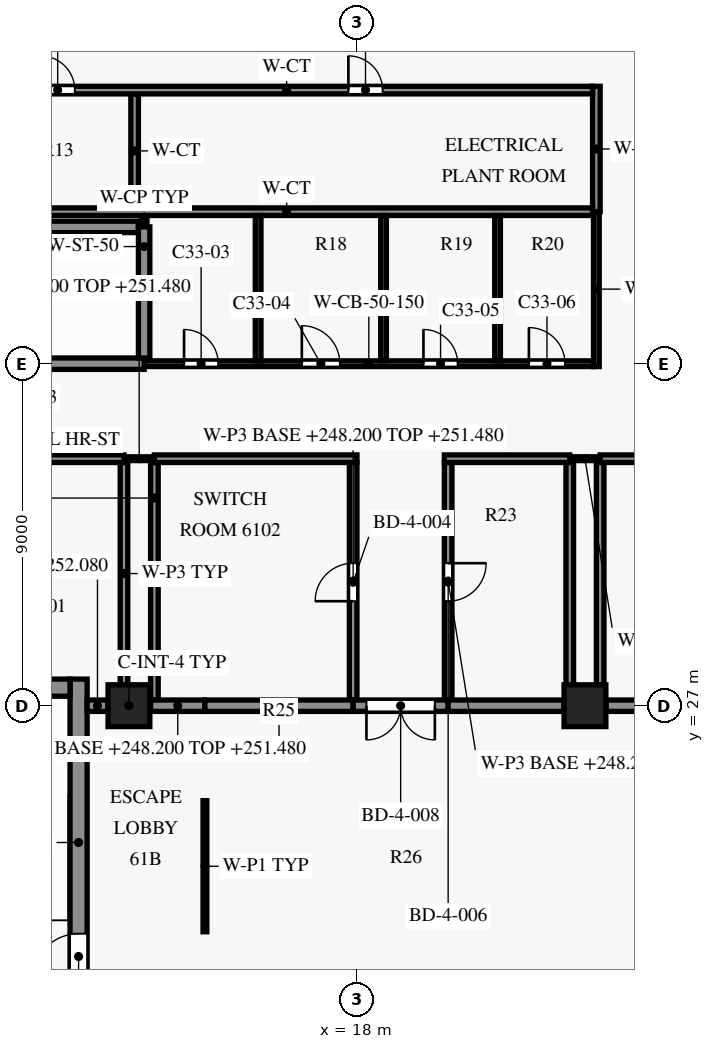
"""IFC4 building model, lengths in metres.
Left out: names, types, materials, properties, quantities, classifications, styles, units other than length and angle.
Written with IfcOpenShell. Run it as: python <this file> out.ifc"""

import sys

from ifc_helpers import new_model, si_unit, direction, frame, frame_2d, origin, origin_2d, place, context, subcontext, project, spatial, rectangle, extrude, element, fill, save


model = new_model("IFC4")
c1 = context("Model", 3, precision=1e-05, world=origin(), true_north=direction((0.0, 1.0)))
c2 = subcontext(c1, "Body", "Model", "MODEL_VIEW")
j1 = project(units=[si_unit("LENGTHUNIT", "METRE"), si_unit("PLANEANGLEUNIT", "RADIAN")], contexts=[c1])
p1 = place(None, origin())
s1 = spatial("IfcSite", under=j1, at=p1, CompositionType="ELEMENT")
p2 = place(p1, origin())
s2 = spatial("IfcBuilding", under=s1, at=p2, CompositionType="ELEMENT")
p3 = place(p2, frame((0.0, 0.0, 248.2)))
s3 = spatial("IfcBuildingStorey", under=s2, at=p3, CompositionType="ELEMENT", Elevation=248.2)
for number, where, z_axis, x_axis in (
    (1, (12.0, 27.0, 0.0), (0.0, 0.0, 1.0), (1.0, 0.0, 0.0)),
    (2, (24.0, 27.0, 0.0), (0.0, 0.0, 1.0), (1.0, 0.0, 0.0)),
):
    element("IfcColumn", number, at=place(p3, frame(where, z_axis=z_axis, x_axis=x_axis)), inside=s3, PredefinedType="COLUMN", context=c2, shape_type="SweptSolid", body=[
        extrude(rectangle(XDim=1.1, YDim=1.1, at=origin_2d()), origin(), (0.0, 0.0, 1.0), 4.2),
    ])
p4 = place(p3, frame((7.15, 27.475, 0.0), z_axis=(0.0, 0.0, 1.0), x_axis=(1.0, 0.0, 0.0)))
e3 = element("IfcWall", 3, at=p4, inside=s3, PredefinedType="SHEAR", context=c2, shape_type="SweptSolid", body=[
    extrude(rectangle(XDim=3.3, YDim=0.45, at=frame_2d((1.65, 0.0))), origin(), (0.0, 0.0, 1.0), 3.9),
])
p5 = place(p3, frame((12.4, 36.0, 0.0), z_axis=(0.0, 0.0, 1.0), x_axis=(1.0, 0.0, 0.0)))
e4 = element("IfcWall", 4, at=p5, inside=s3, PredefinedType="SHEAR", context=c2, shape_type="SweptSolid", body=[
    extrude(rectangle(XDim=11.825, YDim=0.15, at=frame_2d((5.913, 0.0))), origin(), (0.0, 0.0, 1.0), 3.9),
])
p6 = place(p5, frame((1.05, 0.0, 0.0)))
e5 = element("IfcOpeningElement", 5, at=p6, cuts=e4, PredefinedType="OPENING", context=c2, shape_type="SweptSolid", body=[
    extrude(rectangle(XDim=0.9, YDim=2.1, at=frame_2d((0.45, 1.05))), frame((0.0, 0.085, 0.0), z_axis=(0.0, -1.0, 0.0), x_axis=(1.0, 0.0, 0.0)), (0.0, 0.0, 1.0), 0.17),
])
p7 = place(p5, frame((4.15, 0.0, 0.0)))
e6 = element("IfcOpeningElement", 6, at=p7, cuts=e4, PredefinedType="OPENING", context=c2, shape_type="SweptSolid", body=[
    extrude(rectangle(XDim=1.0, YDim=2.1, at=frame_2d((0.5, 1.05))), frame((0.0, 0.085, 0.0), z_axis=(0.0, -1.0, 0.0), x_axis=(1.0, 0.0, 0.0)), (0.0, 0.0, 1.0), 0.17),
])
p8 = place(p5, frame((7.35, 0.0, 0.0)))
e7 = element("IfcOpeningElement", 7, at=p8, cuts=e4, PredefinedType="OPENING", context=c2, shape_type="SweptSolid", body=[
    extrude(rectangle(XDim=0.9, YDim=2.1, at=frame_2d((0.45, 1.05))), frame((0.0, 0.085, 0.0), z_axis=(0.0, -1.0, 0.0), x_axis=(1.0, 0.0, 0.0)), (0.0, 0.0, 1.0), 0.17),
])
p9 = place(p5, frame((10.125, 0.0, 0.0)))
e8 = element("IfcOpeningElement", 8, at=p9, cuts=e4, PredefinedType="OPENING", context=c2, shape_type="SweptSolid", body=[
    extrude(rectangle(XDim=0.95, YDim=2.1, at=frame_2d((0.475, 1.05))), frame((0.0, 0.085, 0.0), z_axis=(0.0, -1.0, 0.0), x_axis=(1.0, 0.0, 0.0)), (0.0, 0.0, 1.0), 0.17),
])
p10 = place(p3, frame((4.55, 36.0, 0.0), z_axis=(0.0, 0.0, 1.0), x_axis=(1.0, 0.0, 0.0)))
e9 = element("IfcWall", 9, at=p10, inside=s3, PredefinedType="SHEAR", context=c2, shape_type="SweptSolid", body=[
    extrude(rectangle(XDim=7.85, YDim=0.3, at=frame_2d((3.925, 0.0))), origin(), (0.0, 0.0, 1.0), 3.9),
])
p11 = place(p10, frame((0.15, 0.0, 0.0)))
e10 = element("IfcOpeningElement", 10, at=p11, cuts=e9, PredefinedType="OPENING", context=c2, shape_type="SweptSolid", body=[
    extrude(rectangle(XDim=1.5, YDim=2.2, at=frame_2d((0.75, 1.1))), frame((0.0, 0.16, 0.0), z_axis=(0.0, -1.0, 0.0), x_axis=(1.0, 0.0, 0.0)), (0.0, 0.0, 1.0), 0.32),
])
p12 = place(p3, frame((4.55, 39.6, 0.0), z_axis=(0.0, 0.0, 1.0), x_axis=(1.0, 0.0, 0.0)))
e11 = element("IfcWall", 11, at=p12, inside=s3, PredefinedType="SHEAR", context=c2, shape_type="SweptSolid", body=[
    extrude(rectangle(XDim=7.7, YDim=0.3, at=frame_2d((3.85, 0.0))), origin(), (0.0, 0.0, 1.0), 3.9),
])
p13 = place(p3, frame((8.1, 40.0, 0.0), z_axis=(0.0, 0.0, 1.0), x_axis=(1.0, 0.0, 0.0)))
e12 = element("IfcWall", 12, at=p13, inside=s3, PredefinedType="PARTITIONING", context=c2, shape_type="SweptSolid", body=[
    extrude(rectangle(XDim=16.1, YDim=0.2, at=frame_2d((8.05, 0.0))), origin(), (0.0, 0.0, 1.0), 3.9),
])
p14 = place(p3, frame((8.1, 43.2, 0.0), z_axis=(0.0, 0.0, 1.0), x_axis=(1.0, 0.0, 0.0)))
e13 = element("IfcWall", 13, at=p14, inside=s3, PredefinedType="PARTITIONING", context=c2, shape_type="SweptSolid", body=[
    extrude(rectangle(XDim=16.1, YDim=0.2, at=frame_2d((8.05, 0.0))), origin(), (0.0, 0.0, 1.0), 3.9),
])
p15 = place(p14, frame((1.575, 0.0, 0.0)))
e14 = element("IfcOpeningElement", 14, at=p15, cuts=e13, PredefinedType="OPENING", context=c2, shape_type="SweptSolid", body=[
    extrude(rectangle(XDim=0.9, YDim=2.1, at=frame_2d((0.45, 1.05))), frame((0.0, 0.11, 0.0), z_axis=(0.0, -1.0, 0.0), x_axis=(1.0, 0.0, 0.0)), (0.0, 0.0, 1.0), 0.22),
])
p16 = place(p14, frame((9.675, 0.0, 0.0)))
e15 = element("IfcOpeningElement", 15, at=p16, cuts=e13, PredefinedType="OPENING", context=c2, shape_type="SweptSolid", body=[
    extrude(rectangle(XDim=0.9, YDim=2.1, at=frame_2d((0.45, 1.05))), frame((0.0, 0.11, 0.0), z_axis=(0.0, -1.0, 0.0), x_axis=(1.0, 0.0, 0.0)), (0.0, 0.0, 1.0), 0.22),
])
p17 = place(p3, frame((10.675, 19.1, 0.0), z_axis=(0.0, 0.0, 1.0), x_axis=(0.0, 1.0, 0.0)))
e16 = element("IfcWall", 16, at=p17, inside=s3, PredefinedType="SHEAR", context=c2, shape_type="SweptSolid", body=[
    extrude(rectangle(XDim=8.6, YDim=0.45, at=frame_2d((4.3, 0.0))), origin(), (0.0, 0.0, 1.0), 3.9),
])
p18 = place(p17, frame((0.7, 0.0, 0.0)))
e17 = element("IfcOpeningElement", 17, at=p18, cuts=e16, PredefinedType="OPENING", context=c2, shape_type="SweptSolid", body=[
    extrude(rectangle(XDim=1.2, YDim=2.2, at=frame_2d((0.6, 1.1))), frame((0.0, 0.235, 0.0), z_axis=(0.0, -1.0, 0.0), x_axis=(1.0, 0.0, 0.0)), (0.0, 0.0, 1.0), 0.47),
])
p19 = place(p3, frame((12.15, 40.1, 0.0), z_axis=(0.0, 0.0, 1.0), x_axis=(0.0, 1.0, 0.0)))
e18 = element("IfcWall", 18, at=p19, inside=s3, PredefinedType="PARTITIONING", context=c2, shape_type="SweptSolid", body=[
    extrude(rectangle(XDim=3.0, YDim=0.2, at=frame_2d((1.5, 0.0))), origin(), (0.0, 0.0, 1.0), 3.9),
])
p20 = place(p3, frame((12.4, 39.6, 0.0), z_axis=(0.0, 0.0, 1.0), x_axis=(0.0, 1.0, 0.0)))
e19 = element("IfcWall", 19, at=p20, inside=s3, PredefinedType="PARTITIONING", context=c2, shape_type="SweptSolid", body=[
    extrude(rectangle(XDim=0.3, YDim=0.15, at=frame_2d((0.15, 0.0))), origin(), (0.0, 0.0, 1.0), 3.9),
])
p21 = place(p3, frame((12.4, 36.15, 0.0), z_axis=(0.0, 0.0, 1.0), x_axis=(0.0, 1.0, 0.0)))
e20 = element("IfcWall", 20, at=p21, inside=s3, PredefinedType="SHEAR", context=c2, shape_type="SweptSolid", body=[
    extrude(rectangle(XDim=3.45, YDim=0.3, at=frame_2d((1.725, 0.0))), origin(), (0.0, 0.0, 1.0), 3.9),
])
for number, where, z_axis, x_axis in (
    (21, (15.4, 36.075, 0.0), (0.0, 0.0, 1.0), (0.0, 1.0, 0.0)),
    (22, (18.7, 36.075, 0.0), (0.0, 0.0, 1.0), (0.0, 1.0, 0.0)),
    (23, (21.7, 36.075, 0.0), (0.0, 0.0, 1.0), (0.0, 1.0, 0.0)),
):
    element("IfcWall", number, at=place(p3, frame(where, z_axis=z_axis, x_axis=x_axis)), inside=s3, PredefinedType="PARTITIONING", context=c2, shape_type="SweptSolid", body=[
        extrude(rectangle(XDim=3.825, YDim=0.15, at=frame_2d((1.913, 0.0))), origin(), (0.0, 0.0, 1.0), 3.9),
    ])
p22 = place(p3, frame((24.3, 35.925, 0.0), z_axis=(0.0, 0.0, 1.0), x_axis=(0.0, 1.0, 0.0)))
e24 = element("IfcWall", 24, at=p22, inside=s3, PredefinedType="SHEAR", context=c2, shape_type="SweptSolid", body=[
    extrude(rectangle(XDim=4.075, YDim=0.15, at=frame_2d((2.038, 0.0))), origin(), (0.0, 0.0, 1.0), 3.9),
])
p23 = place(p3, frame((24.3, 40.0, 0.0), z_axis=(0.0, 0.0, 1.0), x_axis=(0.0, 1.0, 0.0)))
e25 = element("IfcWall", 25, at=p23, inside=s3, PredefinedType="PARTITIONING", context=c2, shape_type="SweptSolid", body=[
    extrude(rectangle(XDim=3.3, YDim=0.2, at=frame_2d((1.65, 0.0))), origin(), (0.0, 0.0, 1.0), 3.9),
])
p24 = place(p3, frame((14.0, 24.5, 0.0), z_axis=(0.0, 0.0, 1.0), x_axis=(0.0, -1.0, 0.0)))
e26 = element("IfcWall", 26, at=p24, inside=s3, PredefinedType="PARTITIONING", context=c2, shape_type="SweptSolid", body=[
    extrude(rectangle(XDim=3.45, YDim=0.1, at=frame_2d((1.725, 0.0))), origin(), (0.0, 0.0, 1.0), 3.88),
])
p25 = place(p3, frame((10.9, 27.0, 0.0), z_axis=(0.0, 0.0, 1.0), x_axis=(1.0, 0.0, 0.0)))
e27 = element("IfcWall", 27, at=p25, inside=s3, PredefinedType="PARTITIONING", context=c2, shape_type="SweptSolid", body=[
    extrude(rectangle(XDim=0.545, YDim=0.3, at=frame_2d((0.272, 0.0))), origin(), (0.0, 0.0, 1.0), 3.88),
])
p26 = place(p3, frame((12.57, 27.0, 0.0), z_axis=(0.0, 0.0, 1.0), x_axis=(1.0, 0.0, 0.0)))
e28 = element("IfcWall", 28, at=p26, inside=s3, PredefinedType="PARTITIONING", context=c2, shape_type="SweptSolid", body=[
    extrude(rectangle(XDim=1.43, YDim=0.3, at=frame_2d((0.715, 0.0))), origin(), (0.0, 0.0, 1.0), 3.28),
])
p27 = place(p3, frame((17.9, 27.0, 0.0), z_axis=(0.0, 0.0, 1.0), x_axis=(-1.0, 0.0, 0.0)))
e29 = element("IfcWall", 29, at=p27, inside=s3, PredefinedType="PARTITIONING", context=c2, shape_type="SweptSolid", body=[
    extrude(rectangle(XDim=3.9, YDim=0.3, at=frame_2d((1.95, 0.0))), origin(), (0.0, 0.0, 1.0), 3.28),
])
p28 = place(p3, frame((20.4, 27.0, 0.0), z_axis=(0.0, 0.0, 1.0), x_axis=(-1.0, 0.0, 0.0)))
e30 = element("IfcWall", 30, at=p28, inside=s3, PredefinedType="PARTITIONING", context=c2, shape_type="SweptSolid", body=[
    extrude(rectangle(XDim=2.5, YDim=0.3, at=frame_2d((1.25, 0.0))), origin(), (0.0, 0.0, 1.0), 3.28),
])
p29 = place(p28, frame((0.35, 0.0, 0.0)))
e31 = element("IfcOpeningElement", 31, at=p29, cuts=e30, PredefinedType="OPENING", context=c2, shape_type="SweptSolid", body=[
    extrude(rectangle(XDim=1.8, YDim=2.1, at=frame_2d((0.9, 1.05))), frame((0.0, 0.16, 0.0), z_axis=(0.0, -1.0, 0.0), x_axis=(1.0, 0.0, 0.0)), (0.0, 0.0, 1.0), 0.32),
])
p30 = place(p3, frame((23.445, 27.0, 0.0), z_axis=(0.0, 0.0, 1.0), x_axis=(-1.0, 0.0, 0.0)))
e32 = element("IfcWall", 32, at=p30, inside=s3, PredefinedType="PARTITIONING", context=c2, shape_type="SweptSolid", body=[
    extrude(rectangle(XDim=3.045, YDim=0.3, at=frame_2d((1.522, 0.0))), origin(), (0.0, 0.0, 1.0), 3.28),
])
p31 = place(p3, frame((33.1, 27.0, 0.0), z_axis=(0.0, 0.0, 1.0), x_axis=(-1.0, 0.0, 0.0)))
e33 = element("IfcWall", 33, at=p31, inside=s3, PredefinedType="PARTITIONING", context=c2, shape_type="SweptSolid", body=[
    extrude(rectangle(XDim=8.545, YDim=0.3, at=frame_2d((4.272, 0.0))), origin(), (0.0, 0.0, 1.0), 3.28),
])
p32 = place(p3, frame((12.67, 27.16, 0.0), z_axis=(0.0, 0.0, 1.0), x_axis=(0.0, 1.0, 0.0)))
e34 = element("IfcWall", 34, at=p32, inside=s3, PredefinedType="PARTITIONING", context=c2, shape_type="SweptSolid", body=[
    extrude(rectangle(XDim=6.24, YDim=0.2, at=frame_2d((3.12, 0.0))), origin(), (0.0, 0.0, 1.0), 3.28),
])
p33 = place(p3, frame((17.9, 27.16, 0.0), z_axis=(0.0, 0.0, 1.0), x_axis=(0.0, 1.0, 0.0)))
e35 = element("IfcWall", 35, at=p33, inside=s3, PredefinedType="PARTITIONING", context=c2, shape_type="SweptSolid", body=[
    extrude(rectangle(XDim=6.24, YDim=0.2, at=frame_2d((3.12, 0.0))), origin(), (0.0, 0.0, 1.0), 3.28),
])
p34 = place(p33, frame((2.59, 0.0, 0.0)))
e36 = element("IfcOpeningElement", 36, at=p34, cuts=e35, PredefinedType="OPENING", context=c2, shape_type="SweptSolid", body=[
    extrude(rectangle(XDim=1.0, YDim=2.1, at=frame_2d((0.5, 1.05))), frame((0.0, 0.11, 0.0), z_axis=(0.0, -1.0, 0.0), x_axis=(1.0, 0.0, 0.0)), (0.0, 0.0, 1.0), 0.22),
])
for number, where, z_axis, x_axis in (
    (37, (24.4, 27.555, 0.0), (0.0, 0.0, 1.0), (0.0, 1.0, 0.0)),
    (38, (11.87, 33.4, 0.0), (0.0, 0.0, 1.0), (0.0, -1.0, 0.0)),
):
    element("IfcWall", number, at=place(p3, frame(where, z_axis=z_axis, x_axis=x_axis)), inside=s3, PredefinedType="PARTITIONING", context=c2, shape_type="SweptSolid", body=[
        extrude(rectangle(XDim=5.845, YDim=0.2, at=frame_2d((2.922, 0.0))), origin(), (0.0, 0.0, 1.0), 3.88),
    ])
p35 = place(p3, frame((20.4, 33.4, 0.0), z_axis=(0.0, 0.0, 1.0), x_axis=(0.0, -1.0, 0.0)))
e39 = element("IfcWall", 39, at=p35, inside=s3, PredefinedType="PARTITIONING", context=c2, shape_type="SweptSolid", body=[
    extrude(rectangle(XDim=6.24, YDim=0.2, at=frame_2d((3.12, 0.0))), origin(), (0.0, 0.0, 1.0), 3.28),
])
p36 = place(p35, frame((2.65, 0.0, 0.0)))
e40 = element("IfcOpeningElement", 40, at=p36, cuts=e39, PredefinedType="OPENING", context=c2, shape_type="SweptSolid", body=[
    extrude(rectangle(XDim=1.0, YDim=2.1, at=frame_2d((0.5, 1.05))), frame((0.0, 0.11, 0.0), z_axis=(0.0, -1.0, 0.0), x_axis=(1.0, 0.0, 0.0)), (0.0, 0.0, 1.0), 0.22),
])
p37 = place(p3, frame((23.6, 33.4, 0.0), z_axis=(0.0, 0.0, 1.0), x_axis=(0.0, -1.0, 0.0)))
e41 = element("IfcWall", 41, at=p37, inside=s3, PredefinedType="PARTITIONING", context=c2, shape_type="SweptSolid", body=[
    extrude(rectangle(XDim=5.845, YDim=0.2, at=frame_2d((2.922, 0.0))), origin(), (0.0, 0.0, 1.0), 3.88),
])
p38 = place(p3, frame((11.87, 33.5, 0.0), z_axis=(0.0, 0.0, 1.0), x_axis=(-1.0, 0.0, 0.0)))
e42 = element("IfcWall", 42, at=p38, inside=s3, PredefinedType="PARTITIONING", context=c2, shape_type="SweptSolid", body=[
    extrude(rectangle(XDim=5.47, YDim=0.2, at=frame_2d((2.735, 0.0))), origin(), (0.0, 0.0, 1.0), 3.88),
])
p39 = place(p38, frame((2.295, 0.0, 0.0)))
e43 = element("IfcOpeningElement", 43, at=p39, cuts=e42, PredefinedType="OPENING", context=c2, shape_type="SweptSolid", body=[
    extrude(rectangle(XDim=1.0, YDim=2.1, at=frame_2d((0.5, 1.05))), frame((0.0, 0.11, 0.0), z_axis=(0.0, -1.0, 0.0), x_axis=(1.0, 0.0, 0.0)), (0.0, 0.0, 1.0), 0.22),
])
p40 = place(p3, frame((12.67, 33.5, 0.0), z_axis=(0.0, 0.0, 1.0), x_axis=(-1.0, 0.0, 0.0)))
e44 = element("IfcWall", 44, at=p40, inside=s3, PredefinedType="PARTITIONING", context=c2, shape_type="SweptSolid", body=[
    extrude(rectangle(XDim=0.8, YDim=0.1, at=frame_2d((0.4, 0.0))), origin(), (0.0, 0.0, 1.0), 3.28),
])
p41 = place(p3, frame((18.0, 33.5, 0.0), z_axis=(0.0, 0.0, 1.0), x_axis=(-1.0, 0.0, 0.0)))
e45 = element("IfcWall", 45, at=p41, inside=s3, PredefinedType="PARTITIONING", context=c2, shape_type="SweptSolid", body=[
    extrude(rectangle(XDim=5.33, YDim=0.2, at=frame_2d((2.665, 0.0))), origin(), (0.0, 0.0, 1.0), 3.88),
])
p42 = place(p3, frame((23.6, 33.5, 0.0), z_axis=(0.0, 0.0, 1.0), x_axis=(-1.0, 0.0, 0.0)))
e46 = element("IfcWall", 46, at=p42, inside=s3, PredefinedType="PARTITIONING", context=c2, shape_type="SweptSolid", body=[
    extrude(rectangle(XDim=3.3, YDim=0.2, at=frame_2d((1.65, 0.0))), origin(), (0.0, 0.0, 1.0), 3.88),
])
p43 = place(p3, frame((24.4, 33.5, 0.0), z_axis=(0.0, 0.0, 1.0), x_axis=(-1.0, 0.0, 0.0)))
e47 = element("IfcWall", 47, at=p43, inside=s3, PredefinedType="PARTITIONING", context=c2, shape_type="SweptSolid", body=[
    extrude(rectangle(XDim=0.8, YDim=0.1, at=frame_2d((0.4, 0.0))), origin(), (0.0, 0.0, 1.0), 3.28),
])
p44 = place(p3, frame((31.6, 33.5, 0.0), z_axis=(0.0, 0.0, 1.0), x_axis=(-1.0, 0.0, 0.0)))
e48 = element("IfcWall", 48, at=p44, inside=s3, PredefinedType="PARTITIONING", context=c2, shape_type="SweptSolid", body=[
    extrude(rectangle(XDim=7.2, YDim=0.2, at=frame_2d((3.6, 0.0))), origin(), (0.0, 0.0, 1.0), 3.88),
])
p45 = place(p44, frame((3.15, 0.0, 0.0)))
e49 = element("IfcOpeningElement", 49, at=p45, cuts=e48, PredefinedType="OPENING", context=c2, shape_type="SweptSolid", body=[
    extrude(rectangle(XDim=1.0, YDim=2.1, at=frame_2d((0.5, 1.05))), frame((0.0, 0.11, 0.0), z_axis=(0.0, -1.0, 0.0), x_axis=(1.0, 0.0, 0.0)), (0.0, 0.0, 1.0), 0.22),
])
p46 = place(p6, origin())
e50 = element("IfcDoor", 50, at=p46, inside=s3, OperationType="SINGLE_SWING_RIGHT", PredefinedType="DOOR", context=c2, shape_type="SweptSolid", body=[
    extrude(rectangle(XDim=0.9, YDim=2.1, at=frame_2d((0.45, 1.05))), frame((0.0, 0.025, 0.0), z_axis=(0.0, -1.0, 0.0), x_axis=(1.0, 0.0, 0.0)), (0.0, 0.0, 1.0), 0.05),
])
fill(e5, e50)
p47 = place(p7, origin())
e51 = element("IfcDoor", 51, at=p47, inside=s3, OperationType="SINGLE_SWING_LEFT", PredefinedType="DOOR", context=c2, shape_type="SweptSolid", body=[
    extrude(rectangle(XDim=1.0, YDim=2.1, at=frame_2d((0.5, 1.05))), frame((0.0, 0.025, 0.0), z_axis=(0.0, -1.0, 0.0), x_axis=(1.0, 0.0, 0.0)), (0.0, 0.0, 1.0), 0.05),
])
fill(e6, e51)
p48 = place(p8, origin())
e52 = element("IfcDoor", 52, at=p48, inside=s3, OperationType="SINGLE_SWING_RIGHT", PredefinedType="DOOR", context=c2, shape_type="SweptSolid", body=[
    extrude(rectangle(XDim=0.9, YDim=2.1, at=frame_2d((0.45, 1.05))), frame((0.0, 0.025, 0.0), z_axis=(0.0, -1.0, 0.0), x_axis=(1.0, 0.0, 0.0)), (0.0, 0.0, 1.0), 0.05),
])
fill(e7, e52)
p49 = place(p9, origin())
e53 = element("IfcDoor", 53, at=p49, inside=s3, OperationType="SINGLE_SWING_LEFT", PredefinedType="DOOR", context=c2, shape_type="SweptSolid", body=[
    extrude(rectangle(XDim=0.95, YDim=2.1, at=frame_2d((0.475, 1.05))), frame((0.0, 0.025, 0.0), z_axis=(0.0, -1.0, 0.0), x_axis=(1.0, 0.0, 0.0)), (0.0, 0.0, 1.0), 0.05),
])
fill(e8, e53)
p50 = place(p15, origin())
e54 = element("IfcDoor", 54, at=p50, inside=s3, OperationType="SINGLE_SWING_RIGHT", PredefinedType="DOOR", context=c2, shape_type="SweptSolid", body=[
    extrude(rectangle(XDim=0.9, YDim=2.1, at=frame_2d((0.45, 1.05))), frame((0.0, 0.025, 0.0), z_axis=(0.0, -1.0, 0.0), x_axis=(1.0, 0.0, 0.0)), (0.0, 0.0, 1.0), 0.05),
])
fill(e14, e54)
p51 = place(p16, origin())
e55 = element("IfcDoor", 55, at=p51, inside=s3, OperationType="SINGLE_SWING_LEFT", PredefinedType="DOOR", context=c2, shape_type="SweptSolid", body=[
    extrude(rectangle(XDim=0.9, YDim=2.1, at=frame_2d((0.45, 1.05))), frame((0.0, 0.025, 0.0), z_axis=(0.0, -1.0, 0.0), x_axis=(1.0, 0.0, 0.0)), (0.0, 0.0, 1.0), 0.05),
])
fill(e15, e55)
p52 = place(p18, origin())
e56 = element("IfcDoor", 56, at=p52, inside=s3, OperationType="SINGLE_SWING_RIGHT", PredefinedType="DOOR", context=c2, shape_type="SweptSolid", body=[
    extrude(rectangle(XDim=1.2, YDim=2.2, at=frame_2d((0.6, 1.1))), frame((0.0, 0.025, 0.0), z_axis=(0.0, -1.0, 0.0), x_axis=(1.0, 0.0, 0.0)), (0.0, 0.0, 1.0), 0.05),
])
fill(e17, e56)
p53 = place(p34, origin())
e57 = element("IfcDoor", 57, at=p53, inside=s3, OperationType="SINGLE_SWING_RIGHT", PredefinedType="DOOR", context=c2, shape_type="SweptSolid", body=[
    extrude(rectangle(XDim=1.0, YDim=2.1, at=frame_2d((0.5, 1.05))), frame((0.0, 0.025, 0.0), z_axis=(0.0, -1.0, 0.0), x_axis=(1.0, 0.0, 0.0)), (0.0, 0.0, 1.0), 0.05),
])
fill(e36, e57)
p54 = place(p36, origin())
e58 = element("IfcDoor", 58, at=p54, inside=s3, OperationType="SINGLE_SWING_LEFT", PredefinedType="DOOR", context=c2, shape_type="SweptSolid", body=[
    extrude(rectangle(XDim=1.0, YDim=2.1, at=frame_2d((0.5, 1.05))), frame((0.0, 0.025, 0.0), z_axis=(0.0, -1.0, 0.0), x_axis=(1.0, 0.0, 0.0)), (0.0, 0.0, 1.0), 0.05),
])
fill(e40, e58)
p55 = place(p29, origin())
e59 = element("IfcDoor", 59, at=p55, inside=s3, OperationType="DOUBLE_DOOR_SINGLE_SWING", PredefinedType="DOOR", context=c2, shape_type="SweptSolid", body=[
    extrude(rectangle(XDim=1.8, YDim=2.1, at=frame_2d((0.9, 1.05))), frame((0.0, 0.025, 0.0), z_axis=(0.0, -1.0, 0.0), x_axis=(1.0, 0.0, 0.0)), (0.0, 0.0, 1.0), 0.05),
])
fill(e31, e59)
save(model, sys.argv[1])
